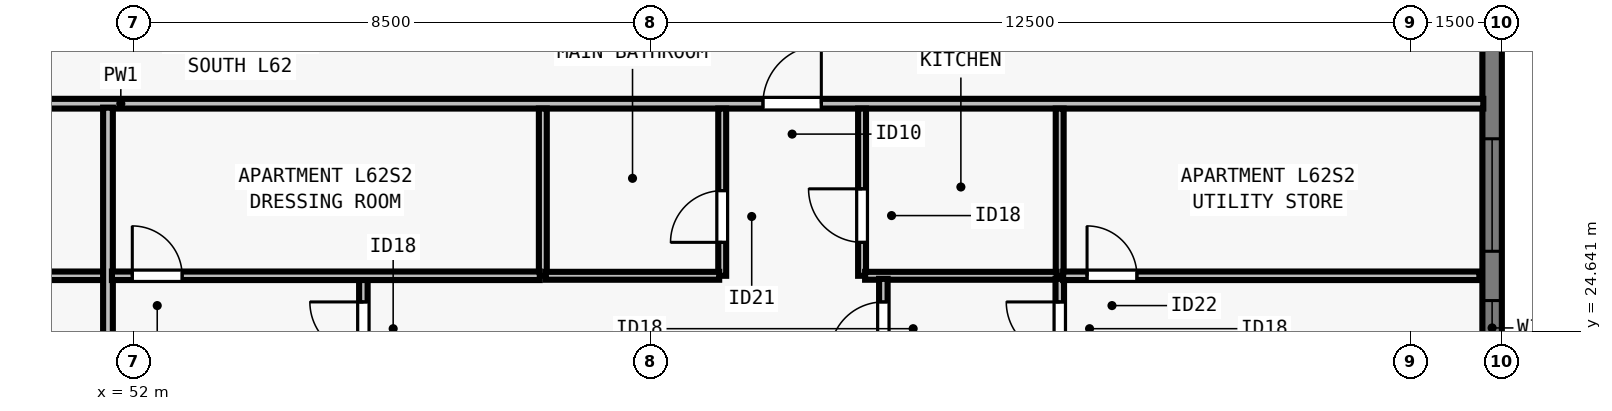
"""IFC4 building model, lengths in metres.
Left out: names, types, materials, properties, quantities, classifications, styles, units other than length and angle.
Written with IfcOpenShell. Run it as: python <this file> out.ifc"""

import sys

from ifc_helpers import new_model, si_unit, direction, frame, frame_2d, origin, place, context, subcontext, project, spatial, rectangle, extrude, element, fill, save


model = new_model("IFC4")
c1 = context("Model", 3, precision=1e-05, world=origin(), true_north=direction((0.0, 1.0)))
c2 = subcontext(c1, "Body", "Model", "MODEL_VIEW")
j1 = project(units=[si_unit("LENGTHUNIT", "METRE"), si_unit("PLANEANGLEUNIT", "RADIAN")], contexts=[c1])
p1 = place(None, origin())
s1 = spatial("IfcSite", under=j1, at=p1, CompositionType="ELEMENT")
p2 = place(p1, origin())
s2 = spatial("IfcBuilding", under=s1, at=p2, CompositionType="ELEMENT")
p3 = place(p2, frame((0.0, 0.0, 227.0)))
s3 = spatial("IfcBuildingStorey", under=s2, at=p3, CompositionType="ELEMENT", Elevation=227.0)
p4 = place(p3, frame((74.34, 56.5, 0.0), z_axis=(0.0, 0.0, 1.0), x_axis=(0.0, -1.0, 0.0)))
e1 = element("IfcWall", 1, at=p4, inside=s3, PredefinedType="SOLIDWALL", context=c2, shape_type="SweptSolid", body=[
    extrude(rectangle(XDim=34.702, YDim=0.32, at=frame_2d((17.351, 0.0))), origin(), (0.0, 0.0, 1.0), 3.29),
])
p5 = place(p4, frame((4.763, 0.0, 0.8)))
e2 = element("IfcOpeningElement", 2, at=p5, cuts=e1, PredefinedType="OPENING", context=c2, shape_type="SweptSolid", body=[
    extrude(rectangle(XDim=1.55, YDim=1.678, at=frame_2d((0.775, 0.839))), frame((0.0, 0.17, 0.0), z_axis=(0.0, -1.0, 0.0), x_axis=(1.0, 0.0, 0.0)), (0.0, 0.0, 1.0), 0.34),
])
p6 = place(p4, frame((9.238, 0.0, 0.8)))
e3 = element("IfcOpeningElement", 3, at=p6, cuts=e1, PredefinedType="OPENING", context=c2, shape_type="SweptSolid", body=[
    extrude(rectangle(XDim=1.85, YDim=1.678, at=frame_2d((0.925, 0.839))), frame((0.0, 0.17, 0.0), z_axis=(0.0, -1.0, 0.0), x_axis=(1.0, 0.0, 0.0)), (0.0, 0.0, 1.0), 0.34),
])
p7 = place(p4, frame((14.738, 0.0, 0.8)))
e4 = element("IfcOpeningElement", 4, at=p7, cuts=e1, PredefinedType="OPENING", context=c2, shape_type="SweptSolid", body=[
    extrude(rectangle(XDim=1.85, YDim=1.678, at=frame_2d((0.925, 0.839))), frame((0.0, 0.17, 0.0), z_axis=(0.0, -1.0, 0.0), x_axis=(1.0, 0.0, 0.0)), (0.0, 0.0, 1.0), 0.34),
])
p8 = place(p4, frame((18.264, 0.0, 0.8)))
e5 = element("IfcOpeningElement", 5, at=p8, cuts=e1, PredefinedType="OPENING", context=c2, shape_type="SweptSolid", body=[
    extrude(rectangle(XDim=1.55, YDim=1.678, at=frame_2d((0.775, 0.839))), frame((0.0, 0.17, 0.0), z_axis=(0.0, -1.0, 0.0), x_axis=(1.0, 0.0, 0.0)), (0.0, 0.0, 1.0), 0.34),
])
p9 = place(p4, frame((24.164, 0.0, 0.8)))
e6 = element("IfcOpeningElement", 6, at=p9, cuts=e1, PredefinedType="OPENING", context=c2, shape_type="SweptSolid", body=[
    extrude(rectangle(XDim=1.55, YDim=1.678, at=frame_2d((0.775, 0.839))), frame((0.0, 0.17, 0.0), z_axis=(0.0, -1.0, 0.0), x_axis=(1.0, 0.0, 0.0)), (0.0, 0.0, 1.0), 0.34),
])
p10 = place(p4, frame((28.689, 0.0, 0.8)))
e7 = element("IfcOpeningElement", 7, at=p10, cuts=e1, PredefinedType="OPENING", context=c2, shape_type="SweptSolid", body=[
    extrude(rectangle(XDim=1.85, YDim=1.678, at=frame_2d((0.925, 0.839))), frame((0.0, 0.17, 0.0), z_axis=(0.0, -1.0, 0.0), x_axis=(1.0, 0.0, 0.0)), (0.0, 0.0, 1.0), 0.34),
])
p11 = place(p4, frame((31.35, 0.0, 0.8)))
e8 = element("IfcOpeningElement", 8, at=p11, cuts=e1, PredefinedType="OPENING", context=c2, shape_type="SweptSolid", body=[
    extrude(rectangle(XDim=0.9, YDim=1.678, at=frame_2d((0.45, 0.839))), frame((0.0, 0.17, 0.0), z_axis=(0.0, -1.0, 0.0), x_axis=(1.0, 0.0, 0.0)), (0.0, 0.0, 1.0), 0.34),
])
p12 = place(p3, frame((29.805, 28.387, 0.0), z_axis=(0.0, 0.0, 1.0), x_axis=(1.0, 0.0, 0.0)))
e9 = element("IfcWall", 9, at=p12, inside=s3, PredefinedType="PARTITIONING", context=c2, shape_type="SweptSolid", body=[
    extrude(rectangle(XDim=44.39, YDim=0.16, at=frame_2d((22.195, 0.0))), origin(), (0.0, 0.0, 1.0), 2.958),
])
p13 = place(p12, frame((10.464, 0.0, 0.0)))
e10 = element("IfcOpeningElement", 10, at=p13, cuts=e9, PredefinedType="OPENING", context=c2, shape_type="SweptSolid", body=[
    extrude(rectangle(XDim=0.96, YDim=2.18, at=frame_2d((0.48, 1.09))), frame((0.0, 0.09, 0.0), z_axis=(0.0, -1.0, 0.0), x_axis=(1.0, 0.0, 0.0)), (0.0, 0.0, 1.0), 0.18),
])
p14 = place(p12, frame((32.544, 0.0, 0.0)))
e11 = element("IfcOpeningElement", 11, at=p14, cuts=e9, PredefinedType="OPENING", context=c2, shape_type="SweptSolid", body=[
    extrude(rectangle(XDim=0.96, YDim=2.18, at=frame_2d((0.48, 1.09))), frame((0.0, 0.09, 0.0), z_axis=(0.0, -1.0, 0.0), x_axis=(1.0, 0.0, 0.0)), (0.0, 0.0, 1.0), 0.18),
])
p15 = place(p3, frame((45.199, 25.558, 0.0), z_axis=(0.0, 0.0, 1.0), x_axis=(1.0, 0.0, 0.0)))
e12 = element("IfcWall", 12, at=p15, inside=s3, PredefinedType="PARTITIONING", context=c2, shape_type="SweptSolid", body=[
    extrude(rectangle(XDim=6.429, YDim=0.14, at=frame_2d((3.214, 0.0))), origin(), (0.0, 0.0, 1.0), 3.29),
])
p16 = place(p15, frame((0.4, 0.0, 0.0)))
e13 = element("IfcOpeningElement", 13, at=p16, cuts=e12, PredefinedType="OPENING", context=c2, shape_type="SweptSolid", body=[
    extrude(rectangle(XDim=0.82, YDim=2.1, at=frame_2d((0.41, 1.05))), frame((0.0, 0.08, 0.0), z_axis=(0.0, -1.0, 0.0), x_axis=(1.0, 0.0, 0.0)), (0.0, 0.0, 1.0), 0.16),
])
p17 = place(p3, frame((51.577, 16.805, 0.0), z_axis=(0.0, 0.0, 1.0), x_axis=(0.0, 1.0, 0.0)))
e14 = element("IfcWall", 14, at=p17, inside=s3, PredefinedType="PARTITIONING", context=c2, shape_type="SweptSolid", body=[
    extrude(rectangle(XDim=11.518, YDim=0.16, at=frame_2d((5.759, 0.0))), origin(), (0.0, 0.0, 1.0), 2.958),
])
p18 = place(p3, frame((58.729, 25.558, 0.0), z_axis=(0.0, 0.0, 1.0), x_axis=(0.0, 1.0, 0.0)))
e15 = element("IfcWall", 15, at=p18, inside=s3, PredefinedType="PLUMBINGWALL", context=c2, shape_type="SweptSolid", body=[
    extrude(rectangle(XDim=2.75, YDim=0.13, at=frame_2d((1.375, 0.0))), origin(), (0.0, 0.0, 1.0), 3.29),
])
p19 = place(p3, frame((61.679, 25.558, 0.0), z_axis=(0.0, 0.0, 1.0), x_axis=(0.0, 1.0, 0.0)))
e16 = element("IfcWall", 16, at=p19, inside=s3, PredefinedType="PLUMBINGWALL", context=c2, shape_type="SweptSolid", body=[
    extrude(rectangle(XDim=2.75, YDim=0.13, at=frame_2d((1.375, 0.0))), origin(), (0.0, 0.0, 1.0), 3.29),
])
p20 = place(p19, frame((0.55, 0.0, 0.0)))
e17 = element("IfcOpeningElement", 17, at=p20, cuts=e16, PredefinedType="OPENING", context=c2, shape_type="SweptSolid", body=[
    extrude(rectangle(XDim=0.85, YDim=2.08, at=frame_2d((0.425, 1.04))), frame((0.0, 0.075, 0.0), z_axis=(0.0, -1.0, 0.0), x_axis=(1.0, 0.0, 0.0)), (0.0, 0.0, 1.0), 0.15),
])
p21 = place(p3, frame((58.779, 25.558, 0.0), z_axis=(0.0, 0.0, 1.0), x_axis=(1.0, 0.0, 0.0)))
e18 = element("IfcWall", 18, at=p21, inside=s3, PredefinedType="PLUMBINGWALL", context=c2, shape_type="SweptSolid", body=[
    extrude(rectangle(XDim=2.85, YDim=0.13, at=frame_2d((1.425, 0.0))), origin(), (0.0, 0.0, 1.0), 3.29),
])
p22 = place(p3, frame((67.229, 25.558, 0.0), z_axis=(0.0, 0.0, 1.0), x_axis=(0.0, 1.0, 0.0)))
e19 = element("IfcWall", 19, at=p22, inside=s3, PredefinedType="PLUMBINGWALL", context=c2, shape_type="SweptSolid", body=[
    extrude(rectangle(XDim=2.75, YDim=0.13, at=frame_2d((1.375, 0.0))), origin(), (0.0, 0.0, 1.0), 3.29),
])
p23 = place(p3, frame((63.979, 25.558, 0.0), z_axis=(0.0, 0.0, 1.0), x_axis=(0.0, 1.0, 0.0)))
e20 = element("IfcWall", 20, at=p23, inside=s3, PredefinedType="PLUMBINGWALL", context=c2, shape_type="SweptSolid", body=[
    extrude(rectangle(XDim=2.75, YDim=0.13, at=frame_2d((1.375, 0.0))), origin(), (0.0, 0.0, 1.0), 3.29),
])
p24 = place(p23, frame((0.55, 0.0, 0.0)))
e21 = element("IfcOpeningElement", 21, at=p24, cuts=e20, PredefinedType="OPENING", context=c2, shape_type="SweptSolid", body=[
    extrude(rectangle(XDim=0.88, YDim=2.1, at=frame_2d((0.44, 1.05))), frame((0.0, 0.075, 0.0), z_axis=(0.0, -1.0, 0.0), x_axis=(1.0, 0.0, 0.0)), (0.0, 0.0, 1.0), 0.15),
])
p25 = place(p3, frame((64.029, 25.558, 0.0), z_axis=(0.0, 0.0, 1.0), x_axis=(1.0, 0.0, 0.0)))
e22 = element("IfcWall", 22, at=p25, inside=s3, PredefinedType="PLUMBINGWALL", context=c2, shape_type="SweptSolid", body=[
    extrude(rectangle(XDim=3.15, YDim=0.13, at=frame_2d((1.575, 0.0))), origin(), (0.0, 0.0, 1.0), 3.29),
])
p26 = place(p3, frame((55.778, 16.88, 0.0), z_axis=(0.0, 0.0, 1.0), x_axis=(0.0, 1.0, 0.0)))
e23 = element("IfcWall", 23, at=p26, inside=s3, PredefinedType="PARTITIONING", context=c2, shape_type="SweptSolid", body=[
    extrude(rectangle(XDim=8.718, YDim=0.14, at=frame_2d((4.359, 0.0))), origin(), (0.0, 0.0, 1.0), 3.29),
])
p27 = place(p26, frame((7.367, 0.0, 0.0)))
e24 = element("IfcOpeningElement", 24, at=p27, cuts=e23, PredefinedType="OPENING", context=c2, shape_type="SweptSolid", body=[
    extrude(rectangle(XDim=0.88, YDim=2.1, at=frame_2d((0.44, 1.05))), frame((0.0, 0.08, 0.0), z_axis=(0.0, -1.0, 0.0), x_axis=(1.0, 0.0, 0.0)), (0.0, 0.0, 1.0), 0.16),
])
p28 = place(p3, frame((51.643, 25.558, 0.0), z_axis=(0.0, 0.0, 1.0), x_axis=(1.0, 0.0, 0.0)))
e25 = element("IfcWall", 25, at=p28, inside=s3, PredefinedType="PARTITIONING", context=c2, shape_type="SweptSolid", body=[
    extrude(rectangle(XDim=7.036, YDim=0.14, at=frame_2d((3.518, 0.0))), origin(), (0.0, 0.0, 1.0), 3.29),
])
p29 = place(p28, frame((0.335, 0.0, 0.0)))
e26 = element("IfcOpeningElement", 26, at=p29, cuts=e25, PredefinedType="OPENING", context=c2, shape_type="SweptSolid", body=[
    extrude(rectangle(XDim=0.82, YDim=2.1, at=frame_2d((0.41, 1.05))), frame((0.0, 0.08, 0.0), z_axis=(0.0, -1.0, 0.0), x_axis=(1.0, 0.0, 0.0)), (0.0, 0.0, 1.0), 0.16),
])
p30 = place(p3, frame((67.23, 16.88, 0.0), z_axis=(0.0, 0.0, 1.0), x_axis=(0.0, 1.0, 0.0)))
e27 = element("IfcWall", 27, at=p30, inside=s3, PredefinedType="PARTITIONING", context=c2, shape_type="SweptSolid", body=[
    extrude(rectangle(XDim=8.628, YDim=0.14, at=frame_2d((4.314, 0.0))), origin(), (0.0, 0.0, 1.0), 2.573),
])
p31 = place(p30, frame((7.367, 0.0, 0.0)))
e28 = element("IfcOpeningElement", 28, at=p31, cuts=e27, PredefinedType="OPENING", context=c2, shape_type="SweptSolid", body=[
    extrude(rectangle(XDim=0.88, YDim=2.1, at=frame_2d((0.44, 1.05))), frame((0.0, 0.08, 0.0), z_axis=(0.0, -1.0, 0.0), x_axis=(1.0, 0.0, 0.0)), (0.0, 0.0, 1.0), 0.16),
])
p32 = place(p3, frame((67.285, 25.558, 0.0), z_axis=(0.0, 0.0, 1.0), x_axis=(1.0, 0.0, 0.0)))
e29 = element("IfcWall", 29, at=p32, inside=s3, PredefinedType="PARTITIONING", context=c2, shape_type="SweptSolid", body=[
    extrude(rectangle(XDim=6.845, YDim=0.14, at=frame_2d((3.422, 0.0))), origin(), (0.0, 0.0, 1.0), 2.958),
])
p33 = place(p32, frame((0.394, 0.0, 0.0)))
e30 = element("IfcOpeningElement", 30, at=p33, cuts=e29, PredefinedType="OPENING", context=c2, shape_type="SweptSolid", body=[
    extrude(rectangle(XDim=0.82, YDim=2.1, at=frame_2d((0.41, 1.05))), frame((0.0, 0.08, 0.0), z_axis=(0.0, -1.0, 0.0), x_axis=(1.0, 0.0, 0.0)), (0.0, 0.0, 1.0), 0.16),
])
p34 = place(p3, frame((64.329, 16.88, 0.0), z_axis=(0.0, 0.0, 1.0), x_axis=(0.0, 1.0, 0.0)))
e31 = element("IfcWall", 31, at=p34, inside=s3, PredefinedType="PARTITIONING", context=c2, shape_type="SweptSolid", body=[
    extrude(rectangle(XDim=8.628, YDim=0.14, at=frame_2d((4.314, 0.0))), origin(), (0.0, 0.0, 1.0), 2.573),
])
p35 = place(p34, frame((7.367, 0.0, 0.0)))
e32 = element("IfcOpeningElement", 32, at=p35, cuts=e31, PredefinedType="OPENING", context=c2, shape_type="SweptSolid", body=[
    extrude(rectangle(XDim=0.88, YDim=2.1, at=frame_2d((0.44, 1.05))), frame((0.0, 0.08, 0.0), z_axis=(0.0, -1.0, 0.0), x_axis=(1.0, 0.0, 0.0)), (0.0, 0.0, 1.0), 0.16),
])
p36 = place(p10, origin())
e33 = element("IfcWindow", 33, at=p36, inside=s3, PartitioningType="SINGLE_PANEL", PredefinedType="WINDOW", context=c2, shape_type="SweptSolid", body=[
    extrude(rectangle(XDim=1.85, YDim=1.678, at=frame_2d((0.925, 0.839))), frame((0.0, -0.05, 0.0), z_axis=(0.0, -1.0, 0.0), x_axis=(1.0, 0.0, 0.0)), (0.0, 0.0, 1.0), 0.06),
])
fill(e7, e33)
p37 = place(p11, origin())
e34 = element("IfcWindow", 34, at=p37, inside=s3, PartitioningType="SINGLE_PANEL", PredefinedType="WINDOW", context=c2, shape_type="SweptSolid", body=[
    extrude(rectangle(XDim=0.9, YDim=1.678, at=frame_2d((0.45, 0.839))), frame((0.0, -0.04, 0.0), z_axis=(0.0, -1.0, 0.0), x_axis=(1.0, 0.0, 0.0)), (0.0, 0.0, 1.0), 0.06),
])
fill(e8, e34)
p38 = place(p20, origin())
e35 = element("IfcDoor", 35, at=p38, inside=s3, OperationType="SINGLE_SWING_LEFT", PredefinedType="DOOR", context=c2, shape_type="SweptSolid", body=[
    extrude(rectangle(XDim=0.85, YDim=2.08, at=frame_2d((0.425, 1.04))), frame((0.0, 0.025, 0.0), z_axis=(0.0, -1.0, 0.0), x_axis=(1.0, 0.0, 0.0)), (0.0, 0.0, 1.0), 0.05),
])
fill(e17, e35)
p39 = place(p24, origin())
e36 = element("IfcDoor", 36, at=p39, inside=s3, OperationType="SINGLE_SWING_RIGHT", PredefinedType="DOOR", context=c2, shape_type="SweptSolid", body=[
    extrude(rectangle(XDim=0.88, YDim=2.1, at=frame_2d((0.44, 1.05))), frame((0.0, 0.025, 0.0), z_axis=(0.0, -1.0, 0.0), x_axis=(1.0, 0.0, 0.0)), (0.0, 0.0, 1.0), 0.05),
])
fill(e21, e36)
p40 = place(p29, origin())
e37 = element("IfcDoor", 37, at=p40, inside=s3, OperationType="SINGLE_SWING_LEFT", PredefinedType="DOOR", context=c2, shape_type="SweptSolid", body=[
    extrude(rectangle(XDim=0.82, YDim=2.1, at=frame_2d((0.41, 1.05))), frame((0.0, 0.025, 0.0), z_axis=(0.0, -1.0, 0.0), x_axis=(1.0, 0.0, 0.0)), (0.0, 0.0, 1.0), 0.05),
])
fill(e26, e37)
p41 = place(p27, origin())
e38 = element("IfcDoor", 38, at=p41, inside=s3, OperationType="SINGLE_SWING_RIGHT", PredefinedType="DOOR", context=c2, shape_type="SweptSolid", body=[
    extrude(rectangle(XDim=0.88, YDim=2.1, at=frame_2d((0.44, 1.05))), frame((0.0, 0.025, 0.0), z_axis=(0.0, -1.0, 0.0), x_axis=(1.0, 0.0, 0.0)), (0.0, 0.0, 1.0), 0.05),
])
fill(e24, e38)
p42 = place(p33, origin())
e39 = element("IfcDoor", 39, at=p42, inside=s3, OperationType="SINGLE_SWING_LEFT", PredefinedType="DOOR", context=c2, shape_type="SweptSolid", body=[
    extrude(rectangle(XDim=0.82, YDim=2.1, at=frame_2d((0.41, 1.05))), frame((0.0, 0.025, 0.0), z_axis=(0.0, -1.0, 0.0), x_axis=(1.0, 0.0, 0.0)), (0.0, 0.0, 1.0), 0.05),
])
fill(e30, e39)
p43 = place(p31, origin())
e40 = element("IfcDoor", 40, at=p43, inside=s3, OperationType="SINGLE_SWING_RIGHT", PredefinedType="DOOR", context=c2, shape_type="SweptSolid", body=[
    extrude(rectangle(XDim=0.88, YDim=2.1, at=frame_2d((0.44, 1.05))), frame((0.0, 0.025, 0.0), z_axis=(0.0, -1.0, 0.0), x_axis=(1.0, 0.0, 0.0)), (0.0, 0.0, 1.0), 0.05),
])
fill(e28, e40)
p44 = place(p35, origin())
e41 = element("IfcDoor", 41, at=p44, inside=s3, OperationType="SINGLE_SWING_LEFT", PredefinedType="DOOR", context=c2, shape_type="SweptSolid", body=[
    extrude(rectangle(XDim=0.88, YDim=2.1, at=frame_2d((0.44, 1.05))), frame((0.0, 0.025, 0.0), z_axis=(0.0, -1.0, 0.0), x_axis=(1.0, 0.0, 0.0)), (0.0, 0.0, 1.0), 0.05),
])
fill(e32, e41)
p45 = place(p14, origin())
e42 = element("IfcDoor", 42, at=p45, inside=s3, OperationType="SINGLE_SWING_RIGHT", PredefinedType="DOOR", context=c2, shape_type="SweptSolid", body=[
    extrude(rectangle(XDim=0.96, YDim=2.18, at=frame_2d((0.48, 1.09))), frame((0.0, 0.025, 0.0), z_axis=(0.0, -1.0, 0.0), x_axis=(1.0, 0.0, 0.0)), (0.0, 0.0, 1.0), 0.05),
])
fill(e11, e42)
save(model, sys.argv[1])
